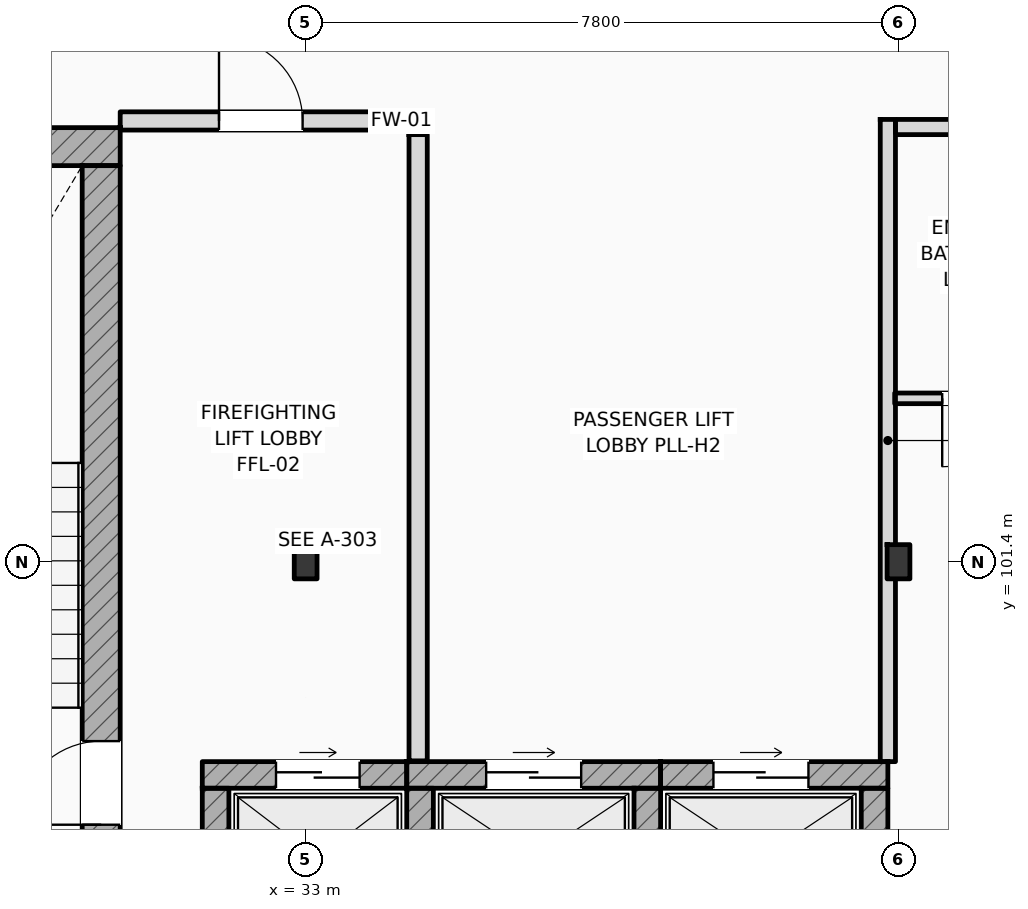
"""IFC4 building model, lengths in metres.
Left out: names, types, materials, properties, quantities, classifications, styles, units other than length and angle.
Written with IfcOpenShell. Run it as: python <this file> out.ifc"""

import sys

from ifc_helpers import new_model, si_unit, direction, frame, frame_2d, origin, origin_2d, place, context, subcontext, project, spatial, rectangle, i_section, extrude, element, fill, save


model = new_model("IFC4")
c1 = context("Model", 3, precision=1e-05, world=origin(), true_north=direction((0.0, 1.0)))
c2 = subcontext(c1, "Body", "Model", "MODEL_VIEW")
j1 = project(units=[si_unit("LENGTHUNIT", "METRE"), si_unit("PLANEANGLEUNIT", "RADIAN")], contexts=[c1])
p1 = place(None, origin())
s1 = spatial("IfcSite", under=j1, at=p1, CompositionType="ELEMENT")
p2 = place(p1, origin())
s2 = spatial("IfcBuilding", under=s1, at=p2, CompositionType="ELEMENT")
p3 = place(p2, frame((0.0, 0.0, 24.6)))
s3 = spatial("IfcBuildingStorey", under=s2, at=p3, CompositionType="ELEMENT", Elevation=24.6)
for number, where, z_axis, x_axis in (
    (1, (33.0, 101.4, 0.0), (0.0, 0.0, 1.0), (1.0, 0.0, 0.0)),
    (2, (40.8, 101.4, 0.0), (0.0, 0.0, 1.0), (1.0, 0.0, 0.0)),
):
    element("IfcColumn", number, at=place(p3, frame(where, z_axis=z_axis, x_axis=x_axis)), inside=s3, PredefinedType="COLUMN", context=c2, shape_type="SweptSolid", body=[
        extrude(i_section(OverallWidth=0.3, OverallDepth=0.45, WebThickness=0.014, FlangeThickness=0.026, FilletRadius=0.027, at=origin_2d()), origin(), (0.0, 0.0, 1.0), 3.6),
    ])
p4 = place(p3, frame((25.4, 106.862, 0.0), z_axis=(0.0, 0.0, 1.0), x_axis=(1.0, 0.0, 0.0)))
e3 = element("IfcWall", 3, at=p4, inside=s3, PredefinedType="SHEAR", context=c2, shape_type="SweptSolid", body=[
    extrude(rectangle(XDim=5.16, YDim=0.5, at=frame_2d((2.58, 0.0))), origin(), (0.0, 0.0, 1.0), 3.6),
])
p5 = place(p3, frame((30.31, 97.5, 0.0), z_axis=(0.0, 0.0, 1.0), x_axis=(0.0, 1.0, 0.0)))
e4 = element("IfcWall", 4, at=p5, inside=s3, PredefinedType="SHEAR", context=c2, shape_type="SweptSolid", body=[
    extrude(rectangle(XDim=9.112, YDim=0.5, at=frame_2d((4.556, 0.0))), origin(), (0.0, 0.0, 1.0), 3.6),
])
p6 = place(p5, frame((0.44, 0.0, 0.0)))
e5 = element("IfcOpeningElement", 5, at=p6, cuts=e4, PredefinedType="OPENING", context=c2, shape_type="SweptSolid", body=[
    extrude(rectangle(XDim=1.1, YDim=2.2, at=frame_2d((0.55, 1.1))), frame((0.0, 0.26, 0.0), z_axis=(0.0, -1.0, 0.0), x_axis=(1.0, 0.0, 0.0)), (0.0, 0.0, 1.0), 0.52),
])
p7 = place(p3, frame((31.64, 98.595, 0.0), z_axis=(0.0, 0.0, 1.0), x_axis=(1.0, 0.0, 0.0)))
e6 = element("IfcWall", 6, at=p7, inside=s3, PredefinedType="SHEAR", context=c2, shape_type="SweptSolid", body=[
    extrude(rectangle(XDim=2.69, YDim=0.35, at=frame_2d((1.345, 0.0))), origin(), (0.0, 0.0, 1.0), 3.34),
])
p8 = place(p7, frame((0.97, 0.0, 0.0)))
e7 = element("IfcOpeningElement", 7, at=p8, cuts=e6, PredefinedType="OPENING", context=c2, shape_type="SweptSolid", body=[
    extrude(rectangle(XDim=1.1, YDim=2.2, at=frame_2d((0.55, 1.1))), frame((0.0, 0.185, 0.0), z_axis=(0.0, -1.0, 0.0), x_axis=(1.0, 0.0, 0.0)), (0.0, 0.0, 1.0), 0.37),
])
p9 = place(p3, frame((31.815, 96.58, 0.0), z_axis=(0.0, 0.0, 1.0), x_axis=(0.0, 1.0, 0.0)))
e8 = element("IfcWall", 8, at=p9, inside=s3, PredefinedType="SHEAR", context=c2, shape_type="SweptSolid", body=[
    extrude(rectangle(XDim=1.84, YDim=0.35, at=frame_2d((0.92, 0.0))), origin(), (0.0, 0.0, 1.0), 3.34),
])
p10 = place(p3, frame((34.33, 98.595, 0.0), z_axis=(0.0, 0.0, 1.0), x_axis=(1.0, 0.0, 0.0)))
e9 = element("IfcWall", 9, at=p10, inside=s3, PredefinedType="SHEAR", context=c2, shape_type="SweptSolid", body=[
    extrude(rectangle(XDim=3.34, YDim=0.35, at=frame_2d((1.67, 0.0))), origin(), (0.0, 0.0, 1.0), 3.34),
])
p11 = place(p10, frame((1.045, 0.0, 0.0)))
e10 = element("IfcOpeningElement", 10, at=p11, cuts=e9, PredefinedType="OPENING", context=c2, shape_type="SweptSolid", body=[
    extrude(rectangle(XDim=1.25, YDim=2.25, at=frame_2d((0.625, 1.125))), frame((0.0, 0.185, 0.0), z_axis=(0.0, -1.0, 0.0), x_axis=(1.0, 0.0, 0.0)), (0.0, 0.0, 1.0), 0.37),
])
for number, where, z_axis, x_axis in (
    (11, (34.505, 96.58, 0.0), (0.0, 0.0, 1.0), (0.0, 1.0, 0.0)),
    (12, (37.495, 96.58, 0.0), (0.0, 0.0, 1.0), (0.0, 1.0, 0.0)),
):
    element("IfcWall", number, at=place(p3, frame(where, z_axis=z_axis, x_axis=x_axis)), inside=s3, PredefinedType="SHEAR", context=c2, shape_type="SweptSolid", body=[
        extrude(rectangle(XDim=1.84, YDim=0.35, at=frame_2d((0.92, 0.0))), origin(), (0.0, 0.0, 1.0), 3.34),
    ])
p12 = place(p3, frame((37.67, 98.595, 0.0), z_axis=(0.0, 0.0, 1.0), x_axis=(1.0, 0.0, 0.0)))
e13 = element("IfcWall", 13, at=p12, inside=s3, PredefinedType="SHEAR", context=c2, shape_type="SweptSolid", body=[
    extrude(rectangle(XDim=2.99, YDim=0.35, at=frame_2d((1.495, 0.0))), origin(), (0.0, 0.0, 1.0), 3.34),
])
p13 = place(p12, frame((0.695, 0.0, 0.0)))
e14 = element("IfcOpeningElement", 14, at=p13, cuts=e13, PredefinedType="OPENING", context=c2, shape_type="SweptSolid", body=[
    extrude(rectangle(XDim=1.25, YDim=2.25, at=frame_2d((0.625, 1.125))), frame((0.0, 0.185, 0.0), z_axis=(0.0, -1.0, 0.0), x_axis=(1.0, 0.0, 0.0)), (0.0, 0.0, 1.0), 0.37),
])
p14 = place(p3, frame((40.485, 96.58, 0.0), z_axis=(0.0, 0.0, 1.0), x_axis=(0.0, 1.0, 0.0)))
e15 = element("IfcWall", 15, at=p14, inside=s3, PredefinedType="SHEAR", context=c2, shape_type="SweptSolid", body=[
    extrude(rectangle(XDim=1.84, YDim=0.35, at=frame_2d((0.92, 0.0))), origin(), (0.0, 0.0, 1.0), 2.93),
])
p15 = place(p3, frame((34.48, 98.78, 0.0), z_axis=(0.0, 0.0, 1.0), x_axis=(0.0, 1.0, 0.0)))
e16 = element("IfcWall", 16, at=p15, inside=s3, PredefinedType="STANDARD", context=c2, shape_type="SweptSolid", body=[
    extrude(rectangle(XDim=8.24, YDim=0.24, at=frame_2d((4.12, 0.0))), origin(), (0.0, 0.0, 1.0), 3.34),
])
p16 = place(p3, frame((30.56, 107.2, 0.0), z_axis=(0.0, 0.0, 1.0), x_axis=(1.0, 0.0, 0.0)))
e17 = element("IfcWall", 17, at=p16, inside=s3, PredefinedType="STANDARD", context=c2, shape_type="SweptSolid", body=[
    extrude(rectangle(XDim=4.1, YDim=0.24, at=frame_2d((2.05, 0.0))), origin(), (0.0, 0.0, 1.0), 3.34),
])
p17 = place(p16, frame((1.3, 0.0, 0.0)))
e18 = element("IfcOpeningElement", 18, at=p17, cuts=e17, PredefinedType="OPENING", context=c2, shape_type="SweptSolid", body=[
    extrude(rectangle(XDim=1.1, YDim=2.2, at=frame_2d((0.55, 1.1))), frame((0.0, 0.13, 0.0), z_axis=(0.0, -1.0, 0.0), x_axis=(1.0, 0.0, 0.0)), (0.0, 0.0, 1.0), 0.26),
])
p18 = place(p3, frame((40.76, 107.12, 0.0), z_axis=(0.0, 0.0, 1.0), x_axis=(1.0, 0.0, 0.0)))
e19 = element("IfcWall", 19, at=p18, inside=s3, PredefinedType="PARTITIONING", context=c2, shape_type="SweptSolid", body=[
    extrude(rectangle(XDim=23.44, YDim=0.2, at=frame_2d((11.72, 0.0))), origin(), (0.0, 0.0, 1.0), 3.34),
])
p19 = place(p18, frame((2.449, 0.0, 0.0)))
e20 = element("IfcOpeningElement", 20, at=p19, cuts=e19, PredefinedType="OPENING", context=c2, shape_type="SweptSolid", body=[
    extrude(rectangle(XDim=0.96, YDim=2.2, at=frame_2d((0.48, 1.1))), frame((0.0, 0.11, 0.0), z_axis=(0.0, -1.0, 0.0), x_axis=(1.0, 0.0, 0.0)), (0.0, 0.0, 1.0), 0.22),
])
p20 = place(p18, frame((4.253, 0.0, 0.0)))
e21 = element("IfcOpeningElement", 21, at=p20, cuts=e19, PredefinedType="OPENING", context=c2, shape_type="SweptSolid", body=[
    extrude(rectangle(XDim=0.96, YDim=2.2, at=frame_2d((0.48, 1.1))), frame((0.0, 0.11, 0.0), z_axis=(0.0, -1.0, 0.0), x_axis=(1.0, 0.0, 0.0)), (0.0, 0.0, 1.0), 0.22),
])
p21 = place(p18, frame((10.311, 0.0, 0.0)))
e22 = element("IfcOpeningElement", 22, at=p21, cuts=e19, PredefinedType="OPENING", context=c2, shape_type="SweptSolid", body=[
    extrude(rectangle(XDim=0.96, YDim=2.2, at=frame_2d((0.48, 1.1))), frame((0.0, 0.11, 0.0), z_axis=(0.0, -1.0, 0.0), x_axis=(1.0, 0.0, 0.0)), (0.0, 0.0, 1.0), 0.22),
])
p22 = place(p18, frame((12.069, 0.0, 0.0)))
e23 = element("IfcOpeningElement", 23, at=p22, cuts=e19, PredefinedType="OPENING", context=c2, shape_type="SweptSolid", body=[
    extrude(rectangle(XDim=0.96, YDim=2.2, at=frame_2d((0.48, 1.1))), frame((0.0, 0.11, 0.0), z_axis=(0.0, -1.0, 0.0), x_axis=(1.0, 0.0, 0.0)), (0.0, 0.0, 1.0), 0.22),
])
p23 = place(p18, frame((18.128, 0.0, 0.0)))
e24 = element("IfcOpeningElement", 24, at=p23, cuts=e19, PredefinedType="OPENING", context=c2, shape_type="SweptSolid", body=[
    extrude(rectangle(XDim=0.96, YDim=2.2, at=frame_2d((0.48, 1.1))), frame((0.0, 0.11, 0.0), z_axis=(0.0, -1.0, 0.0), x_axis=(1.0, 0.0, 0.0)), (0.0, 0.0, 1.0), 0.22),
])
p24 = place(p18, frame((19.841, 0.0, 0.0)))
e25 = element("IfcOpeningElement", 25, at=p24, cuts=e19, PredefinedType="OPENING", context=c2, shape_type="SweptSolid", body=[
    extrude(rectangle(XDim=0.96, YDim=2.2, at=frame_2d((0.48, 1.1))), frame((0.0, 0.11, 0.0), z_axis=(0.0, -1.0, 0.0), x_axis=(1.0, 0.0, 0.0)), (0.0, 0.0, 1.0), 0.22),
])
p25 = place(p3, frame((40.66, 98.77, 0.0), z_axis=(0.0, 0.0, 1.0), x_axis=(0.0, 1.0, 0.0)))
e26 = element("IfcWall", 26, at=p25, inside=s3, PredefinedType="PARTITIONING", context=c2, shape_type="SweptSolid", body=[
    extrude(rectangle(XDim=8.45, YDim=0.2, at=frame_2d((4.225, 0.0))), origin(), (0.0, 0.0, 1.0), 2.93),
])
p26 = place(p3, frame((40.75, 103.55, 0.0), z_axis=(0.0, 0.0, 1.0), x_axis=(1.0, 0.0, 0.0)))
e27 = element("IfcWall", 27, at=p26, inside=s3, PredefinedType="PARTITIONING", context=c2, shape_type="SweptSolid", body=[
    extrude(rectangle(XDim=2.15, YDim=0.14, at=frame_2d((1.075, 0.0))), origin(), (0.0, 0.0, 1.0), 3.34),
])
p27 = place(p26, frame((0.625, 0.0, 0.0)))
e28 = element("IfcOpeningElement", 28, at=p27, cuts=e27, PredefinedType="OPENING", context=c2, shape_type="SweptSolid", body=[
    extrude(rectangle(XDim=0.9, YDim=2.1, at=frame_2d((0.45, 1.05))), frame((0.0, 0.08, 0.0), z_axis=(0.0, -1.0, 0.0), x_axis=(1.0, 0.0, 0.0)), (0.0, 0.0, 1.0), 0.16),
])
p28 = place(p6, origin())
e29 = element("IfcDoor", 29, at=p28, inside=s3, OperationType="SINGLE_SWING_LEFT", PredefinedType="DOOR", context=c2, shape_type="SweptSolid", body=[
    extrude(rectangle(XDim=1.1, YDim=2.2, at=frame_2d((0.55, 1.1))), frame((0.0, 0.025, 0.0), z_axis=(0.0, -1.0, 0.0), x_axis=(1.0, 0.0, 0.0)), (0.0, 0.0, 1.0), 0.05),
])
fill(e5, e29)
p29 = place(p8, origin())
e30 = element("IfcDoor", 30, at=p29, inside=s3, OperationType="SLIDING_TO_LEFT", PredefinedType="DOOR", context=c2, shape_type="SweptSolid", body=[
    extrude(rectangle(XDim=1.1, YDim=2.2, at=frame_2d((0.55, 1.1))), frame((0.0, 0.025, 0.0), z_axis=(0.0, -1.0, 0.0), x_axis=(1.0, 0.0, 0.0)), (0.0, 0.0, 1.0), 0.05),
])
fill(e7, e30)
p30 = place(p11, origin())
e31 = element("IfcDoor", 31, at=p30, inside=s3, OperationType="SLIDING_TO_LEFT", PredefinedType="DOOR", context=c2, shape_type="SweptSolid", body=[
    extrude(rectangle(XDim=1.25, YDim=2.25, at=frame_2d((0.625, 1.125))), frame((0.0, 0.025, 0.0), z_axis=(0.0, -1.0, 0.0), x_axis=(1.0, 0.0, 0.0)), (0.0, 0.0, 1.0), 0.05),
])
fill(e10, e31)
p31 = place(p13, origin())
e32 = element("IfcDoor", 32, at=p31, inside=s3, OperationType="SLIDING_TO_LEFT", PredefinedType="DOOR", context=c2, shape_type="SweptSolid", body=[
    extrude(rectangle(XDim=1.25, YDim=2.25, at=frame_2d((0.625, 1.125))), frame((0.0, 0.025, 0.0), z_axis=(0.0, -1.0, 0.0), x_axis=(1.0, 0.0, 0.0)), (0.0, 0.0, 1.0), 0.05),
])
fill(e14, e32)
p32 = place(p17, origin())
e33 = element("IfcDoor", 33, at=p32, inside=s3, OperationType="SINGLE_SWING_LEFT", PredefinedType="DOOR", context=c2, shape_type="SweptSolid", body=[
    extrude(rectangle(XDim=1.1, YDim=2.2, at=frame_2d((0.55, 1.1))), frame((0.0, 0.025, 0.0), z_axis=(0.0, -1.0, 0.0), x_axis=(1.0, 0.0, 0.0)), (0.0, 0.0, 1.0), 0.05),
])
fill(e18, e33)
p33 = place(p27, frame((0.9, 0.0, 0.0), z_axis=(0.0, 0.0, 1.0), x_axis=(-1.0, 0.0, 0.0)))
e34 = element("IfcDoor", 34, at=p33, inside=s3, OperationType="SINGLE_SWING_LEFT", PredefinedType="DOOR", context=c2, shape_type="SweptSolid", body=[
    extrude(rectangle(XDim=0.9, YDim=2.1, at=frame_2d((0.45, 1.05))), frame((0.0, 0.025, 0.0), z_axis=(0.0, -1.0, 0.0), x_axis=(1.0, 0.0, 0.0)), (0.0, 0.0, 1.0), 0.05),
])
fill(e28, e34)
save(model, sys.argv[1])
